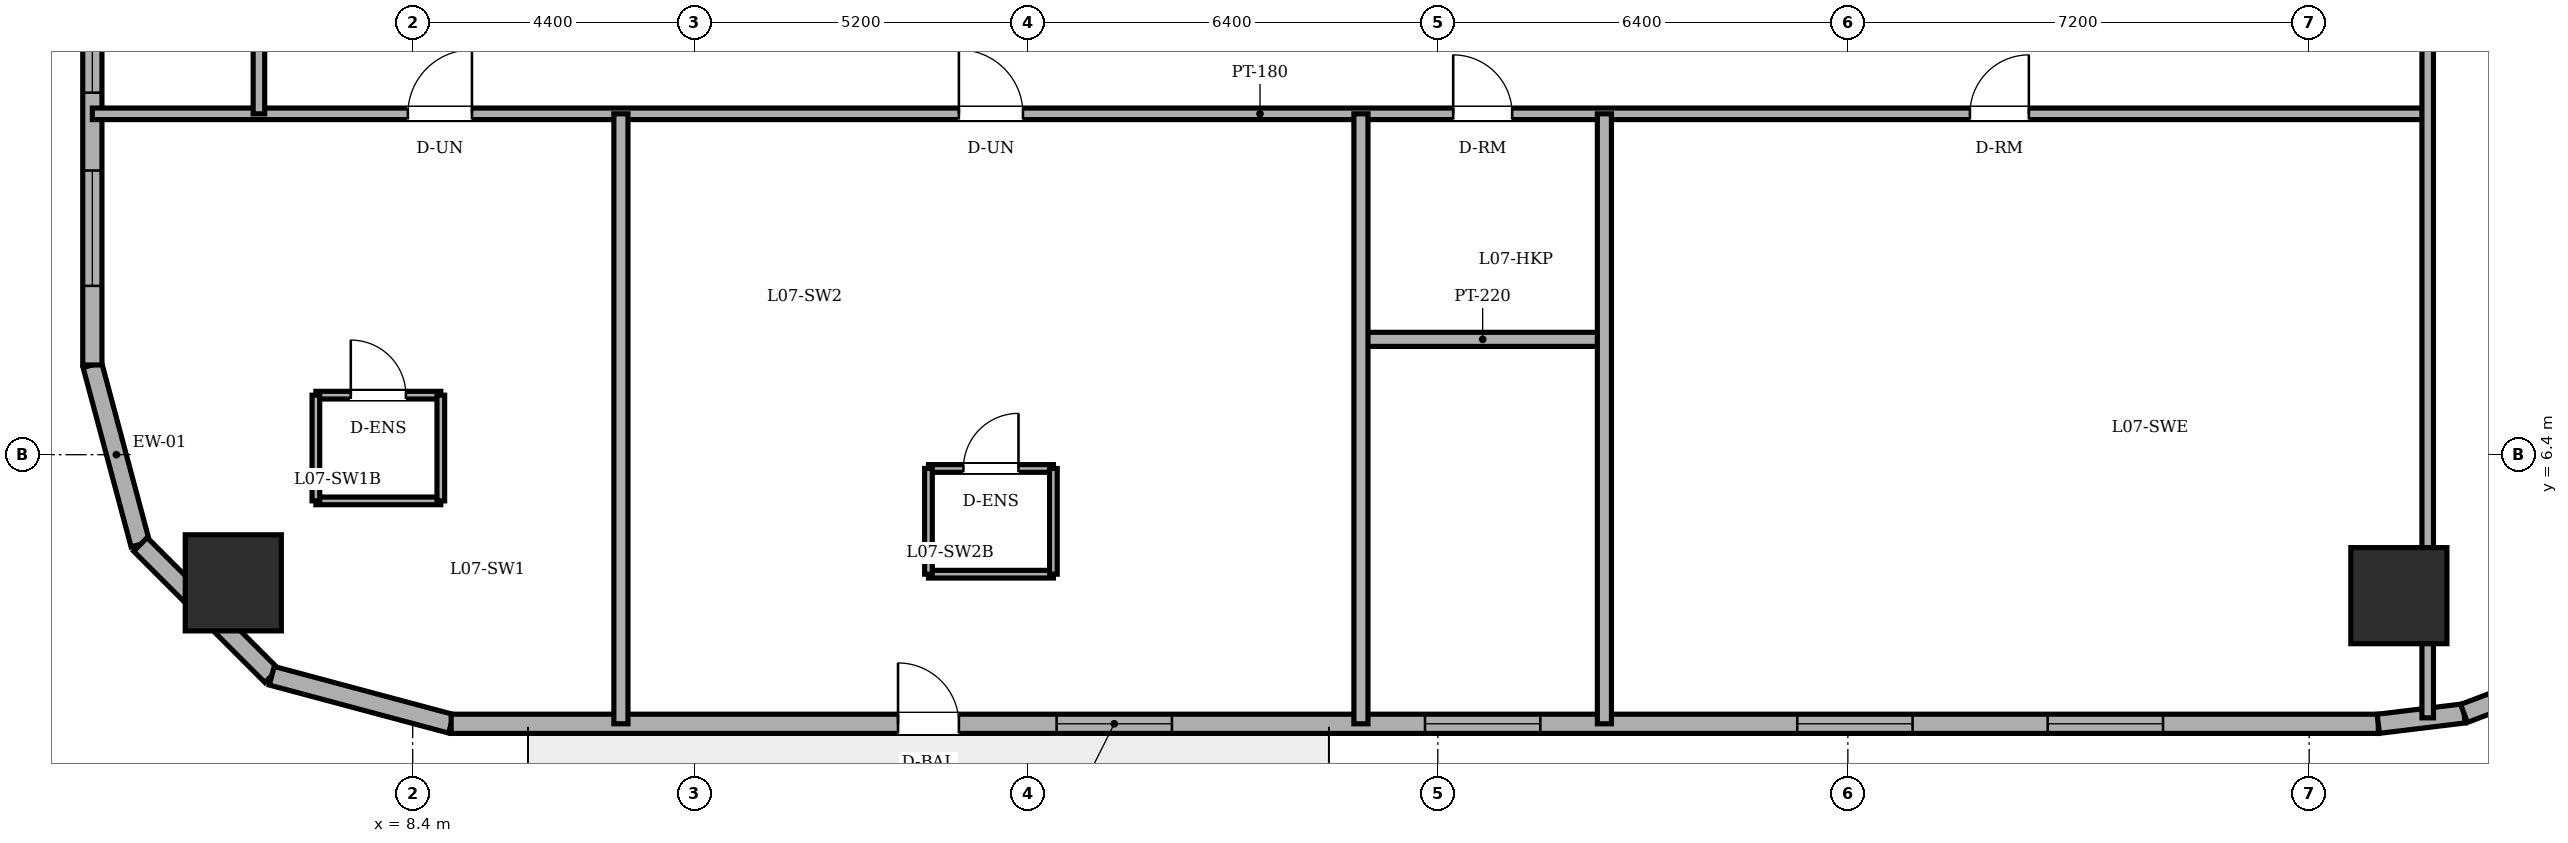
"""IFC4 building model, lengths in metres.
Left out: names, types, materials, properties, quantities, classifications, styles, units other than length and angle.
Written with IfcOpenShell. Run it as: python <this file> out.ifc"""

import sys

from ifc_helpers import new_model, si_unit, direction, frame, frame_2d, origin, origin_2d, place, context, subcontext, project, spatial, rectangle, circle, extrude, element, fill, save


model = new_model("IFC4")
c1 = context("Model", 3, precision=1e-05, world=origin(), true_north=direction((0.0, 1.0)))
c2 = subcontext(c1, "Body", "Model", "MODEL_VIEW")
j1 = project(units=[si_unit("LENGTHUNIT", "METRE"), si_unit("PLANEANGLEUNIT", "RADIAN")], contexts=[c1])
p1 = place(None, origin())
s1 = spatial("IfcSite", under=j1, at=p1, CompositionType="ELEMENT")
p2 = place(p1, origin())
s2 = spatial("IfcBuilding", under=s1, at=p2, CompositionType="ELEMENT")
p3 = place(p2, frame((0.0, 0.0, 28.8)))
s3 = spatial("IfcBuildingStorey", under=s2, at=p3, CompositionType="ELEMENT", Elevation=28.8)
for number, where, z_axis, x_axis in (
    (1, (5.6, 4.4, 0.0), (0.0, 0.0, 1.0), (1.0, 0.0, 0.0)),
    (2, (39.4, 4.2, 0.0), (0.0, 0.0, 1.0), (1.0, 0.0, 0.0)),
):
    element("IfcColumn", number, at=place(p3, frame(where, z_axis=z_axis, x_axis=x_axis)), inside=s3, PredefinedType="COLUMN", context=c2, shape_type="SweptSolid", body=[
        extrude(circle(Radius=0.75, at=origin_2d()), origin(), (0.0, 0.0, 1.0), 3.6),
    ])
p4 = place(p3, frame((3.4, 7.8, 0.0), z_axis=(0.0, 0.0, 1.0), x_axis=(0.258731875344, -0.96594917914, 0.0)))
e3 = element("IfcWall", 3, at=p4, inside=s3, PredefinedType="SOLIDWALL", context=c2, shape_type="SweptSolid", body=[
    extrude(rectangle(XDim=2.899, YDim=0.3, at=frame_2d((1.449, 0.0))), origin(), (0.0, 0.0, 1.0), 3.4),
])
p5 = place(p3, frame((4.15, 5.0, 0.0), z_axis=(0.0, 0.0, 1.0), x_axis=(0.707106781187, -0.707106781187, 0.0)))
e4 = element("IfcWall", 4, at=p5, inside=s3, PredefinedType="SOLIDWALL", context=c2, shape_type="SweptSolid", body=[
    extrude(rectangle(XDim=2.899, YDim=0.3, at=frame_2d((1.45, 0.0))), origin(), (0.0, 0.0, 1.0), 3.4),
])
p6 = place(p3, frame((6.2, 2.95, 0.0), z_axis=(0.0, 0.0, 1.0), x_axis=(0.96594917914, -0.258731875344, 0.0)))
e5 = element("IfcWall", 5, at=p6, inside=s3, PredefinedType="SOLIDWALL", context=c2, shape_type="SweptSolid", body=[
    extrude(rectangle(XDim=2.899, YDim=0.3, at=frame_2d((1.449, 0.0))), origin(), (0.0, 0.0, 1.0), 3.4),
])
p7 = place(p3, frame((9.0, 2.2, 0.0), z_axis=(0.0, 0.0, 1.0), x_axis=(1.0, 0.0, 0.0)))
e6 = element("IfcWall", 6, at=p7, inside=s3, PredefinedType="SOLIDWALL", context=c2, shape_type="SweptSolid", body=[
    extrude(rectangle(XDim=30.079, YDim=0.3, at=frame_2d((15.04, 0.0))), origin(), (0.0, 0.0, 1.0), 3.4),
])
p8 = place(p7, frame((6.975, 0.0, 0.0)))
e7 = element("IfcOpeningElement", 7, at=p8, cuts=e6, PredefinedType="OPENING", context=c2, shape_type="SweptSolid", body=[
    extrude(rectangle(XDim=0.95, YDim=2.2, at=frame_2d((0.475, 1.1))), frame((0.0, 0.16, 0.0), z_axis=(0.0, -1.0, 0.0), x_axis=(1.0, 0.0, 0.0)), (0.0, 0.0, 1.0), 0.32),
])
p9 = place(p7, frame((9.45, 0.0, 0.85)))
e8 = element("IfcOpeningElement", 8, at=p9, cuts=e6, PredefinedType="OPENING", context=c2, shape_type="SweptSolid", body=[
    extrude(rectangle(XDim=1.8, YDim=1.55, at=frame_2d((0.9, 0.775))), frame((0.0, 0.16, 0.0), z_axis=(0.0, -1.0, 0.0), x_axis=(1.0, 0.0, 0.0)), (0.0, 0.0, 1.0), 0.32),
])
p10 = place(p7, frame((15.2, 0.0, 0.85)))
e9 = element("IfcOpeningElement", 9, at=p10, cuts=e6, PredefinedType="OPENING", context=c2, shape_type="SweptSolid", body=[
    extrude(rectangle(XDim=1.8, YDim=1.55, at=frame_2d((0.9, 0.775))), frame((0.0, 0.16, 0.0), z_axis=(0.0, -1.0, 0.0), x_axis=(1.0, 0.0, 0.0)), (0.0, 0.0, 1.0), 0.32),
])
p11 = place(p7, frame((21.01, 0.0, 0.85)))
e10 = element("IfcOpeningElement", 10, at=p11, cuts=e6, PredefinedType="OPENING", context=c2, shape_type="SweptSolid", body=[
    extrude(rectangle(XDim=1.8, YDim=1.55, at=frame_2d((0.9, 0.775))), frame((0.0, 0.16, 0.0), z_axis=(0.0, -1.0, 0.0), x_axis=(1.0, 0.0, 0.0)), (0.0, 0.0, 1.0), 0.32),
])
p12 = place(p7, frame((24.919, 0.0, 0.85)))
e11 = element("IfcOpeningElement", 11, at=p12, cuts=e6, PredefinedType="OPENING", context=c2, shape_type="SweptSolid", body=[
    extrude(rectangle(XDim=1.8, YDim=1.55, at=frame_2d((0.9, 0.775))), frame((0.0, 0.16, 0.0), z_axis=(0.0, -1.0, 0.0), x_axis=(1.0, 0.0, 0.0)), (0.0, 0.0, 1.0), 0.32),
])
p13 = place(p3, frame((39.079, 2.2, 0.0), z_axis=(0.0, 0.0, 1.0), x_axis=(0.992739027259, 0.120288086515, 0.0)))
e12 = element("IfcWall", 12, at=p13, inside=s3, PredefinedType="SOLIDWALL", context=c2, shape_type="SweptSolid", body=[
    extrude(rectangle(XDim=1.348, YDim=0.3, at=frame_2d((0.674, 0.0))), origin(), (0.0, 0.0, 1.0), 3.4),
])
p14 = place(p3, frame((40.417, 2.362, 0.0), z_axis=(0.0, 0.0, 1.0), x_axis=(0.935156721165, 0.354234254216, 0.0)))
e13 = element("IfcWall", 13, at=p14, inside=s3, PredefinedType="SOLIDWALL", context=c2, shape_type="SweptSolid", body=[
    extrude(rectangle(XDim=1.349, YDim=0.3, at=frame_2d((0.675, 0.0))), origin(), (0.0, 0.0, 1.0), 3.4),
])
p15 = place(p3, frame((3.4, 40.2, 0.0), z_axis=(0.0, 0.0, 1.0), x_axis=(0.0, -1.0, 0.0)))
e14 = element("IfcWall", 14, at=p15, inside=s3, PredefinedType="SOLIDWALL", context=c2, shape_type="SweptSolid", body=[
    extrude(rectangle(XDim=32.4, YDim=0.3, at=frame_2d((16.2, 0.0))), origin(), (0.0, 0.0, 1.0), 3.4),
])
p16 = place(p15, frame((1.235, 0.0, 0.85)))
e15 = element("IfcOpeningElement", 15, at=p16, cuts=e14, PredefinedType="OPENING", context=c2, shape_type="SweptSolid", body=[
    extrude(rectangle(XDim=1.8, YDim=1.55, at=frame_2d((0.9, 0.775))), frame((0.0, 0.16, 0.0), z_axis=(0.0, -1.0, 0.0), x_axis=(1.0, 0.0, 0.0)), (0.0, 0.0, 1.0), 0.32),
])
p17 = place(p15, frame((4.25, 0.0, 0.85)))
e16 = element("IfcOpeningElement", 16, at=p17, cuts=e14, PredefinedType="OPENING", context=c2, shape_type="SweptSolid", body=[
    extrude(rectangle(XDim=1.8, YDim=1.55, at=frame_2d((0.9, 0.775))), frame((0.0, 0.16, 0.0), z_axis=(0.0, -1.0, 0.0), x_axis=(1.0, 0.0, 0.0)), (0.0, 0.0, 1.0), 0.32),
])
p18 = place(p15, frame((9.253, 0.0, 0.85)))
e17 = element("IfcOpeningElement", 17, at=p18, cuts=e14, PredefinedType="OPENING", context=c2, shape_type="SweptSolid", body=[
    extrude(rectangle(XDim=1.8, YDim=1.55, at=frame_2d((0.9, 0.775))), frame((0.0, 0.16, 0.0), z_axis=(0.0, -1.0, 0.0), x_axis=(1.0, 0.0, 0.0)), (0.0, 0.0, 1.0), 0.32),
])
p19 = place(p15, frame((13.027, 0.0, 0.85)))
e18 = element("IfcOpeningElement", 18, at=p19, cuts=e14, PredefinedType="OPENING", context=c2, shape_type="SweptSolid", body=[
    extrude(rectangle(XDim=1.8, YDim=1.55, at=frame_2d((0.9, 0.775))), frame((0.0, 0.16, 0.0), z_axis=(0.0, -1.0, 0.0), x_axis=(1.0, 0.0, 0.0)), (0.0, 0.0, 1.0), 0.32),
])
p20 = place(p15, frame((19.573, 0.0, 0.85)))
e19 = element("IfcOpeningElement", 19, at=p20, cuts=e14, PredefinedType="OPENING", context=c2, shape_type="SweptSolid", body=[
    extrude(rectangle(XDim=1.8, YDim=1.55, at=frame_2d((0.9, 0.775))), frame((0.0, 0.16, 0.0), z_axis=(0.0, -1.0, 0.0), x_axis=(1.0, 0.0, 0.0)), (0.0, 0.0, 1.0), 0.32),
])
p21 = place(p15, frame((22.347, 0.0, 0.85)))
e20 = element("IfcOpeningElement", 20, at=p21, cuts=e14, PredefinedType="OPENING", context=c2, shape_type="SweptSolid", body=[
    extrude(rectangle(XDim=1.8, YDim=1.55, at=frame_2d((0.9, 0.775))), frame((0.0, 0.16, 0.0), z_axis=(0.0, -1.0, 0.0), x_axis=(1.0, 0.0, 0.0)), (0.0, 0.0, 1.0), 0.32),
])
p22 = place(p15, frame((26.35, 0.0, 0.85)))
e21 = element("IfcOpeningElement", 21, at=p22, cuts=e14, PredefinedType="OPENING", context=c2, shape_type="SweptSolid", body=[
    extrude(rectangle(XDim=1.8, YDim=1.55, at=frame_2d((0.9, 0.775))), frame((0.0, 0.16, 0.0), z_axis=(0.0, -1.0, 0.0), x_axis=(1.0, 0.0, 0.0)), (0.0, 0.0, 1.0), 0.32),
])
p23 = place(p15, frame((29.365, 0.0, 0.85)))
e22 = element("IfcOpeningElement", 22, at=p23, cuts=e14, PredefinedType="OPENING", context=c2, shape_type="SweptSolid", body=[
    extrude(rectangle(XDim=1.8, YDim=1.55, at=frame_2d((0.9, 0.775))), frame((0.0, 0.16, 0.0), z_axis=(0.0, -1.0, 0.0), x_axis=(1.0, 0.0, 0.0)), (0.0, 0.0, 1.0), 0.32),
])
p24 = place(p3, frame((6.889, 7.329, 0.0), z_axis=(0.0, 0.0, 1.0), x_axis=(1.0, 0.0, 0.0)))
e23 = element("IfcWall", 23, at=p24, inside=s3, PredefinedType="PARTITIONING", context=c2, shape_type="SweptSolid", body=[
    extrude(rectangle(XDim=1.95, YDim=0.12, at=frame_2d((0.975, 0.0))), origin(), (0.0, 0.0, 1.0), 3.4),
])
p25 = place(p24, frame((0.545, 0.0, 0.0)))
e24 = element("IfcOpeningElement", 24, at=p25, cuts=e23, PredefinedType="OPENING", context=c2, shape_type="SweptSolid", body=[
    extrude(rectangle(XDim=0.86, YDim=2.1, at=frame_2d((0.43, 1.05))), frame((0.0, 0.07, 0.0), z_axis=(0.0, -1.0, 0.0), x_axis=(1.0, 0.0, 0.0)), (0.0, 0.0, 1.0), 0.14),
])
p26 = place(p3, frame((8.839, 5.679, 0.0), z_axis=(0.0, 0.0, 1.0), x_axis=(-1.0, 0.0, 0.0)))
e25 = element("IfcWall", 25, at=p26, inside=s3, PredefinedType="PARTITIONING", context=c2, shape_type="SweptSolid", body=[
    extrude(rectangle(XDim=1.95, YDim=0.12, at=frame_2d((0.975, 0.0))), origin(), (0.0, 0.0, 1.0), 3.4),
])
for number, where, z_axis, x_axis in (
    (26, (6.889, 7.329, 0.0), (0.0, 0.0, 1.0), (0.0, -1.0, 0.0)),
    (27, (8.839, 5.679, 0.0), (0.0, 0.0, 1.0), (0.0, 1.0, 0.0)),
):
    element("IfcWall", number, at=place(p3, frame(where, z_axis=z_axis, x_axis=x_axis)), inside=s3, PredefinedType="PARTITIONING", context=c2, shape_type="SweptSolid", body=[
        extrude(rectangle(XDim=1.65, YDim=0.12, at=frame_2d((0.825, 0.0))), origin(), (0.0, 0.0, 1.0), 3.4),
    ])
p27 = place(p3, frame((16.45, 6.185, 0.0), z_axis=(0.0, 0.0, 1.0), x_axis=(1.0, 0.0, 0.0)))
e28 = element("IfcWall", 28, at=p27, inside=s3, PredefinedType="PARTITIONING", context=c2, shape_type="SweptSolid", body=[
    extrude(rectangle(XDim=1.95, YDim=0.12, at=frame_2d((0.975, 0.0))), origin(), (0.0, 0.0, 1.0), 3.4),
])
p28 = place(p27, frame((0.545, 0.0, 0.0)))
e29 = element("IfcOpeningElement", 29, at=p28, cuts=e28, PredefinedType="OPENING", context=c2, shape_type="SweptSolid", body=[
    extrude(rectangle(XDim=0.86, YDim=2.1, at=frame_2d((0.43, 1.05))), frame((0.0, 0.07, 0.0), z_axis=(0.0, -1.0, 0.0), x_axis=(1.0, 0.0, 0.0)), (0.0, 0.0, 1.0), 0.14),
])
p29 = place(p3, frame((18.4, 4.535, 0.0), z_axis=(0.0, 0.0, 1.0), x_axis=(-1.0, 0.0, 0.0)))
e30 = element("IfcWall", 30, at=p29, inside=s3, PredefinedType="PARTITIONING", context=c2, shape_type="SweptSolid", body=[
    extrude(rectangle(XDim=1.95, YDim=0.12, at=frame_2d((0.975, 0.0))), origin(), (0.0, 0.0, 1.0), 2.882),
])
for number, where, z_axis, x_axis in (
    (31, (16.45, 6.185, 0.0), (0.0, 0.0, 1.0), (0.0, -1.0, 0.0)),
    (32, (18.4, 4.535, 0.0), (0.0, 0.0, 1.0), (0.0, 1.0, 0.0)),
):
    element("IfcWall", number, at=place(p3, frame(where, z_axis=z_axis, x_axis=x_axis)), inside=s3, PredefinedType="PARTITIONING", context=c2, shape_type="SweptSolid", body=[
        extrude(rectangle(XDim=1.65, YDim=0.12, at=frame_2d((0.825, 0.0))), origin(), (0.0, 0.0, 1.0), 3.4),
    ])
p30 = place(p3, frame((23.2, 8.2, 0.0), z_axis=(0.0, 0.0, 1.0), x_axis=(1.0, 0.0, 0.0)))
e33 = element("IfcWall", 33, at=p30, inside=s3, PredefinedType="PARTITIONING", context=c2, shape_type="SweptSolid", body=[
    extrude(rectangle(XDim=3.8, YDim=0.22, at=frame_2d((1.9, 0.0))), origin(), (0.0, 0.0, 1.0), 3.4),
])
p31 = place(p3, frame((3.4, 11.72, 0.0), z_axis=(0.0, 0.0, 1.0), x_axis=(1.0, 0.0, 0.0)))
e34 = element("IfcWall", 34, at=p31, inside=s3, PredefinedType="PARTITIONING", context=c2, shape_type="SweptSolid", body=[
    extrude(rectangle(XDim=36.45, YDim=0.18, at=frame_2d((18.225, 0.0))), origin(), (0.0, 0.0, 1.0), 3.4),
])
p32 = place(p31, frame((21.24, 0.0, 0.0)))
e35 = element("IfcOpeningElement", 35, at=p32, cuts=e34, PredefinedType="OPENING", context=c2, shape_type="SweptSolid", body=[
    extrude(rectangle(XDim=0.92, YDim=2.1, at=frame_2d((0.46, 1.05))), frame((0.0, 0.1, 0.0), z_axis=(0.0, -1.0, 0.0), x_axis=(1.0, 0.0, 0.0)), (0.0, 0.0, 1.0), 0.2),
])
p33 = place(p31, frame((4.925, 0.0, 0.0)))
e36 = element("IfcOpeningElement", 36, at=p33, cuts=e34, PredefinedType="OPENING", context=c2, shape_type="SweptSolid", body=[
    extrude(rectangle(XDim=1.0, YDim=2.15, at=frame_2d((0.5, 1.075))), frame((0.0, 0.1, 0.0), z_axis=(0.0, -1.0, 0.0), x_axis=(1.0, 0.0, 0.0)), (0.0, 0.0, 1.0), 0.2),
])
p34 = place(p31, frame((13.525, 0.0, 0.0)))
e37 = element("IfcOpeningElement", 37, at=p34, cuts=e34, PredefinedType="OPENING", context=c2, shape_type="SweptSolid", body=[
    extrude(rectangle(XDim=1.0, YDim=2.15, at=frame_2d((0.5, 1.075))), frame((0.0, 0.1, 0.0), z_axis=(0.0, -1.0, 0.0), x_axis=(1.0, 0.0, 0.0)), (0.0, 0.0, 1.0), 0.2),
])
p35 = place(p31, frame((29.305, 0.0, 0.0)))
e38 = element("IfcOpeningElement", 38, at=p35, cuts=e34, PredefinedType="OPENING", context=c2, shape_type="SweptSolid", body=[
    extrude(rectangle(XDim=0.92, YDim=2.1, at=frame_2d((0.46, 1.05))), frame((0.0, 0.1, 0.0), z_axis=(0.0, -1.0, 0.0), x_axis=(1.0, 0.0, 0.0)), (0.0, 0.0, 1.0), 0.2),
])
p36 = place(p3, frame((6.0, 11.72, 0.0), z_axis=(0.0, 0.0, 1.0), x_axis=(0.0, 1.0, 0.0)))
e39 = element("IfcWall", 39, at=p36, inside=s3, PredefinedType="PARTITIONING", context=c2, shape_type="SweptSolid", body=[
    extrude(rectangle(XDim=2.46, YDim=0.18, at=frame_2d((1.23, 0.0))), origin(), (0.0, 0.0, 1.0), 3.4),
])
for number, where, z_axis, x_axis in (
    (40, (11.65, 2.2, 0.0), (0.0, 0.0, 1.0), (0.0, 1.0, 0.0)),
    (41, (23.2, 2.2, 0.0), (0.0, 0.0, 1.0), (0.0, 1.0, 0.0)),
    (42, (27.0, 2.2, 0.0), (0.0, 0.0, 1.0), (0.0, 1.0, 0.0)),
):
    element("IfcWall", number, at=place(p3, frame(where, z_axis=z_axis, x_axis=x_axis)), inside=s3, PredefinedType="PARTITIONING", context=c2, shape_type="SweptSolid", body=[
        extrude(rectangle(XDim=9.52, YDim=0.22, at=frame_2d((4.76, 0.0))), origin(), (0.0, 0.0, 1.0), 3.4),
    ])
p37 = place(p3, frame((39.85, 2.293, 0.0), z_axis=(0.0, 0.0, 1.0), x_axis=(0.0, 1.0, 0.0)))
e43 = element("IfcWall", 43, at=p37, inside=s3, PredefinedType="PARTITIONING", context=c2, shape_type="SweptSolid", body=[
    extrude(rectangle(XDim=20.527, YDim=0.18, at=frame_2d((10.264, 0.0))), origin(), (0.0, 0.0, 1.0), 2.782),
])
p38 = place(p37, frame((14.257, 0.0, 0.0)))
e44 = element("IfcOpeningElement", 44, at=p38, cuts=e43, PredefinedType="OPENING", context=c2, shape_type="SweptSolid", body=[
    extrude(rectangle(XDim=0.92, YDim=2.1, at=frame_2d((0.46, 1.05))), frame((0.0, 0.1, 0.0), z_axis=(0.0, -1.0, 0.0), x_axis=(1.0, 0.0, 0.0)), (0.0, 0.0, 1.0), 0.2),
])
p39 = place(p8, origin())
e45 = element("IfcDoor", 45, at=p39, inside=s3, OperationType="SINGLE_SWING_LEFT", PredefinedType="DOOR", context=c2, shape_type="SweptSolid", body=[
    extrude(rectangle(XDim=0.95, YDim=2.2, at=frame_2d((0.475, 1.1))), frame((0.0, 0.025, 0.0), z_axis=(0.0, -1.0, 0.0), x_axis=(1.0, 0.0, 0.0)), (0.0, 0.0, 1.0), 0.05),
])
fill(e7, e45)
p40 = place(p9, origin())
e46 = element("IfcWindow", 46, at=p40, inside=s3, PartitioningType="DOUBLE_PANEL_VERTICAL", PredefinedType="WINDOW", context=c2, shape_type="SweptSolid", body=[
    extrude(rectangle(XDim=1.8, YDim=1.55, at=frame_2d((0.9, 0.775))), frame((0.0, 0.03, 0.0), z_axis=(0.0, -1.0, 0.0), x_axis=(1.0, 0.0, 0.0)), (0.0, 0.0, 1.0), 0.06),
])
fill(e8, e46)
p41 = place(p10, origin())
e47 = element("IfcWindow", 47, at=p41, inside=s3, PartitioningType="DOUBLE_PANEL_VERTICAL", PredefinedType="WINDOW", context=c2, shape_type="SweptSolid", body=[
    extrude(rectangle(XDim=1.8, YDim=1.55, at=frame_2d((0.9, 0.775))), frame((0.0, 0.03, 0.0), z_axis=(0.0, -1.0, 0.0), x_axis=(1.0, 0.0, 0.0)), (0.0, 0.0, 1.0), 0.06),
])
fill(e9, e47)
p42 = place(p11, origin())
e48 = element("IfcWindow", 48, at=p42, inside=s3, PartitioningType="DOUBLE_PANEL_VERTICAL", PredefinedType="WINDOW", context=c2, shape_type="SweptSolid", body=[
    extrude(rectangle(XDim=1.8, YDim=1.55, at=frame_2d((0.9, 0.775))), frame((0.0, 0.03, 0.0), z_axis=(0.0, -1.0, 0.0), x_axis=(1.0, 0.0, 0.0)), (0.0, 0.0, 1.0), 0.06),
])
fill(e10, e48)
p43 = place(p12, origin())
e49 = element("IfcWindow", 49, at=p43, inside=s3, PartitioningType="DOUBLE_PANEL_VERTICAL", PredefinedType="WINDOW", context=c2, shape_type="SweptSolid", body=[
    extrude(rectangle(XDim=1.8, YDim=1.55, at=frame_2d((0.9, 0.775))), frame((0.0, 0.03, 0.0), z_axis=(0.0, -1.0, 0.0), x_axis=(1.0, 0.0, 0.0)), (0.0, 0.0, 1.0), 0.06),
])
fill(e11, e49)
p44 = place(p22, origin())
e50 = element("IfcWindow", 50, at=p44, inside=s3, PartitioningType="DOUBLE_PANEL_VERTICAL", PredefinedType="WINDOW", context=c2, shape_type="SweptSolid", body=[
    extrude(rectangle(XDim=1.8, YDim=1.55, at=frame_2d((0.9, 0.775))), frame((0.0, 0.03, 0.0), z_axis=(0.0, -1.0, 0.0), x_axis=(1.0, 0.0, 0.0)), (0.0, 0.0, 1.0), 0.06),
])
fill(e21, e50)
p45 = place(p23, origin())
e51 = element("IfcWindow", 51, at=p45, inside=s3, PartitioningType="DOUBLE_PANEL_VERTICAL", PredefinedType="WINDOW", context=c2, shape_type="SweptSolid", body=[
    extrude(rectangle(XDim=1.8, YDim=1.55, at=frame_2d((0.9, 0.775))), frame((0.0, 0.03, 0.0), z_axis=(0.0, -1.0, 0.0), x_axis=(1.0, 0.0, 0.0)), (0.0, 0.0, 1.0), 0.06),
])
fill(e22, e51)
p46 = place(p25, origin())
e52 = element("IfcDoor", 52, at=p46, inside=s3, OperationType="SINGLE_SWING_LEFT", PredefinedType="DOOR", context=c2, shape_type="SweptSolid", body=[
    extrude(rectangle(XDim=0.86, YDim=2.1, at=frame_2d((0.43, 1.05))), frame((0.0, 0.025, 0.0), z_axis=(0.0, -1.0, 0.0), x_axis=(1.0, 0.0, 0.0)), (0.0, 0.0, 1.0), 0.05),
])
fill(e24, e52)
p47 = place(p28, origin())
e53 = element("IfcDoor", 53, at=p47, inside=s3, OperationType="SINGLE_SWING_RIGHT", PredefinedType="DOOR", context=c2, shape_type="SweptSolid", body=[
    extrude(rectangle(XDim=0.86, YDim=2.1, at=frame_2d((0.43, 1.05))), frame((0.0, 0.025, 0.0), z_axis=(0.0, -1.0, 0.0), x_axis=(1.0, 0.0, 0.0)), (0.0, 0.0, 1.0), 0.05),
])
fill(e29, e53)
p48 = place(p32, origin())
e54 = element("IfcDoor", 54, at=p48, inside=s3, OperationType="SINGLE_SWING_LEFT", PredefinedType="DOOR", context=c2, shape_type="SweptSolid", body=[
    extrude(rectangle(XDim=0.92, YDim=2.1, at=frame_2d((0.46, 1.05))), frame((0.0, 0.025, 0.0), z_axis=(0.0, -1.0, 0.0), x_axis=(1.0, 0.0, 0.0)), (0.0, 0.0, 1.0), 0.05),
])
fill(e35, e54)
p49 = place(p33, origin())
e55 = element("IfcDoor", 55, at=p49, inside=s3, OperationType="SINGLE_SWING_RIGHT", PredefinedType="DOOR", context=c2, shape_type="SweptSolid", body=[
    extrude(rectangle(XDim=1.0, YDim=2.15, at=frame_2d((0.5, 1.075))), frame((0.0, 0.025, 0.0), z_axis=(0.0, -1.0, 0.0), x_axis=(1.0, 0.0, 0.0)), (0.0, 0.0, 1.0), 0.05),
])
fill(e36, e55)
p50 = place(p34, origin())
e56 = element("IfcDoor", 56, at=p50, inside=s3, OperationType="SINGLE_SWING_LEFT", PredefinedType="DOOR", context=c2, shape_type="SweptSolid", body=[
    extrude(rectangle(XDim=1.0, YDim=2.15, at=frame_2d((0.5, 1.075))), frame((0.0, 0.025, 0.0), z_axis=(0.0, -1.0, 0.0), x_axis=(1.0, 0.0, 0.0)), (0.0, 0.0, 1.0), 0.05),
])
fill(e37, e56)
p51 = place(p35, origin())
e57 = element("IfcDoor", 57, at=p51, inside=s3, OperationType="SINGLE_SWING_RIGHT", PredefinedType="DOOR", context=c2, shape_type="SweptSolid", body=[
    extrude(rectangle(XDim=0.92, YDim=2.1, at=frame_2d((0.46, 1.05))), frame((0.0, 0.025, 0.0), z_axis=(0.0, -1.0, 0.0), x_axis=(1.0, 0.0, 0.0)), (0.0, 0.0, 1.0), 0.05),
])
fill(e38, e57)
save(model, sys.argv[1])
